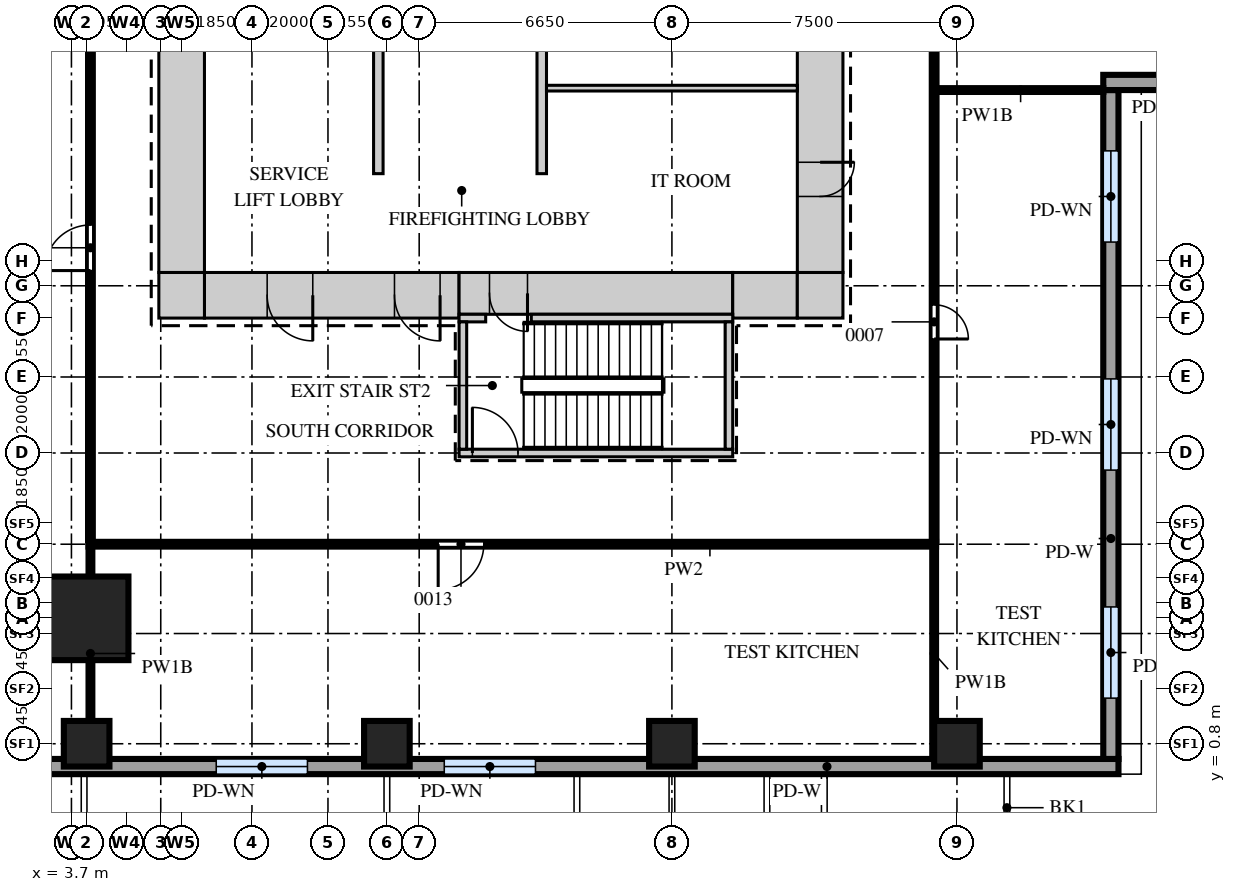
"""IFC4 building model, lengths in metres.
Left out: names, types, materials, properties, quantities, classifications, styles, units other than length and angle.
Written with IfcOpenShell. Run it as: python <this file> out.ifc"""

import sys

from ifc_helpers import new_model, si_unit, direction, frame, frame_2d, origin, origin_2d, place, context, subcontext, project, spatial, rectangle, extrude, source, transform, mapped, element, fill, save


model = new_model("IFC4")
c1 = context("Model", 3, precision=1e-05, world=origin(), true_north=direction((0.0, 1.0)))
c2 = subcontext(c1, "Body", "Model", "MODEL_VIEW")
j1 = project(units=[si_unit("LENGTHUNIT", "METRE"), si_unit("PLANEANGLEUNIT", "RADIAN")], contexts=[c1])
p1 = place(None, origin())
s1 = spatial("IfcSite", under=j1, at=p1, CompositionType="ELEMENT")
p2 = place(p1, origin())
s2 = spatial("IfcBuilding", under=s1, at=p2, CompositionType="ELEMENT")
p3 = place(p2, frame((0.0, 0.0, 23.5)))
s3 = spatial("IfcBuildingStorey", under=s2, at=p3, CompositionType="ELEMENT", Elevation=23.5)
m1 = source(origin(), c2, "Body", "SweptSolid", [
    extrude(rectangle(XDim=6.7, YDim=1.2, at=frame_2d((3.35, 0.0))), origin(), (0.0, 0.0, 1.0), 4.7),
])
p4 = place(p3, frame((7.2, 12.6, 0.0), z_axis=(0.0, 0.0, 1.0), x_axis=(1.0, 0.0, 0.0)))
e1 = element("IfcWall", 1, at=p4, inside=s3, PredefinedType="SHEAR", context=c2, shape_type="MappedRepresentation", body=[
    mapped(m1, transform((0.0, 0.0, 0.0))),
])
m2 = source(origin(), c2, "Body", "SweptSolid", [
    extrude(rectangle(XDim=1.2, YDim=2.1, at=frame_2d((0.6, 1.05))), frame((0.0, 0.61, 0.0), z_axis=(0.0, -1.0, 0.0), x_axis=(1.0, 0.0, 0.0)), (0.0, 0.0, 1.0), 1.22),
])
p5 = place(p4, frame((5.0, 0.0, 0.0)))
e2 = element("IfcOpeningElement", 2, at=p5, cuts=e1, PredefinedType="OPENING", context=c2, shape_type="MappedRepresentation", body=[
    mapped(m2, transform((0.0, 0.0, 0.0))),
])
p6 = place(p4, frame((1.65, 0.0, 0.0)))
e3 = element("IfcOpeningElement", 3, at=p6, cuts=e1, PredefinedType="OPENING", context=c2, shape_type="MappedRepresentation", body=[
    mapped(m2, transform((0.0, 0.0, 0.0))),
])
m3 = source(origin(), c2, "Body", "SweptSolid", [
    extrude(rectangle(XDim=7.2, YDim=1.1, at=frame_2d((3.6, 0.0))), origin(), (0.0, 0.0, 1.0), 4.7),
])
p7 = place(p3, frame((13.9, 12.65, 0.0), z_axis=(0.0, 0.0, 1.0), x_axis=(1.0, 0.0, 0.0)))
e4 = element("IfcWall", 4, at=p7, inside=s3, PredefinedType="SHEAR", context=c2, shape_type="MappedRepresentation", body=[
    mapped(m3, transform((0.0, 0.0, 0.0))),
])
m4 = source(origin(), c2, "Body", "SweptSolid", [
    extrude(rectangle(XDim=1.0, YDim=2.1, at=frame_2d((0.5, 1.05))), frame((0.0, 0.56, 0.0), z_axis=(0.0, -1.0, 0.0), x_axis=(1.0, 0.0, 0.0)), (0.0, 0.0, 1.0), 1.12),
])
p8 = place(p7, frame((0.8, 0.0, 0.0)))
e5 = element("IfcOpeningElement", 5, at=p8, cuts=e4, PredefinedType="OPENING", context=c2, shape_type="MappedRepresentation", body=[
    mapped(m4, transform((0.0, 0.0, 0.0))),
])
m5 = source(origin(), c2, "Body", "SweptSolid", [
    extrude(rectangle(XDim=1.7, YDim=1.2, at=frame_2d((0.85, 0.0))), origin(), (0.0, 0.0, 1.0), 4.7),
])
p9 = place(p3, frame((21.1, 12.6, 0.0), z_axis=(0.0, 0.0, 1.0), x_axis=(1.0, 0.0, 0.0)))
e6 = element("IfcWall", 6, at=p9, inside=s3, PredefinedType="SHEAR", context=c2, shape_type="MappedRepresentation", body=[
    mapped(m5, transform((0.0, 0.0, 0.0))),
])
m6 = source(origin(), c2, "Body", "SweptSolid", [
    extrude(rectangle(XDim=1.2, YDim=1.2, at=frame_2d((0.6, 0.0))), origin(), (0.0, 0.0, 1.0), 4.7),
])
for number, where, z_axis, x_axis in (
    (7, (22.8, 12.6, 0.0), (0.0, 0.0, 1.0), (1.0, 0.0, 0.0)),
    (8, (6.0, 12.6, 0.0), (0.0, 0.0, 1.0), (1.0, 0.0, 0.0)),
):
    element("IfcWall", number, at=place(p3, frame(where, z_axis=z_axis, x_axis=x_axis)), inside=s3, PredefinedType="SHEAR", context=c2, shape_type="MappedRepresentation", body=[
        mapped(m6, transform((0.0, 0.0, 0.0))),
    ])
m7 = source(origin(), c2, "Body", "SweptSolid", [
    extrude(rectangle(XDim=27.6, YDim=1.2, at=frame_2d((13.8, 0.0))), origin(), (0.0, 0.0, 1.0), 4.7),
])
p10 = place(p3, frame((23.4, 13.2, 0.0), z_axis=(0.0, 0.0, 1.0), x_axis=(0.0, 1.0, 0.0)))
e9 = element("IfcWall", 9, at=p10, inside=s3, PredefinedType="SHEAR", context=c2, shape_type="MappedRepresentation", body=[
    mapped(m7, transform((0.0, 0.0, 0.0))),
])
m8 = source(origin(), c2, "Body", "SweptSolid", [
    extrude(rectangle(XDim=1.8, YDim=2.1, at=frame_2d((0.9, 1.05))), frame((0.0, 0.61, 0.0), z_axis=(0.0, -1.0, 0.0), x_axis=(1.0, 0.0, 0.0)), (0.0, 0.0, 1.0), 1.22),
])
p11 = place(p10, frame((22.4, 0.0, 0.0)))
e10 = element("IfcOpeningElement", 10, at=p11, cuts=e9, PredefinedType="OPENING", context=c2, shape_type="MappedRepresentation", body=[
    mapped(m8, transform((0.0, 0.0, 0.0))),
])
p12 = place(p10, frame((12.9, 0.0, 0.0)))
e11 = element("IfcOpeningElement", 11, at=p12, cuts=e9, PredefinedType="OPENING", context=c2, shape_type="MappedRepresentation", body=[
    mapped(m2, transform((0.0, 0.0, 0.0))),
])
m9 = source(origin(), c2, "Body", "SweptSolid", [
    extrude(rectangle(XDim=0.9, YDim=2.1, at=frame_2d((0.45, 1.05))), frame((0.0, 0.61, 0.0), z_axis=(0.0, -1.0, 0.0), x_axis=(1.0, 0.0, 0.0)), (0.0, 0.0, 1.0), 1.22),
])
p13 = place(p10, frame((2.0, 0.0, 0.0)))
e12 = element("IfcOpeningElement", 12, at=p13, cuts=e9, PredefinedType="OPENING", context=c2, shape_type="MappedRepresentation", body=[
    mapped(m9, transform((0.0, 0.0, 0.0))),
])
p14 = place(p10, frame((6.85, 0.0, 0.0)))
e13 = element("IfcOpeningElement", 13, at=p14, cuts=e9, PredefinedType="OPENING", context=c2, shape_type="MappedRepresentation", body=[
    mapped(m9, transform((0.0, 0.0, 0.0))),
])
p15 = place(p3, frame((6.6, 13.2, 0.0), z_axis=(0.0, 0.0, 1.0), x_axis=(0.0, 1.0, 0.0)))
e14 = element("IfcWall", 14, at=p15, inside=s3, PredefinedType="SHEAR", context=c2, shape_type="MappedRepresentation", body=[
    mapped(m7, transform((0.0, 0.0, 0.0))),
])
m10 = source(origin(), c2, "Body", "SweptSolid", [
    extrude(rectangle(XDim=0.7, YDim=0.2, at=frame_2d((0.35, 0.0))), origin(), (0.0, 0.0, 1.0), 4.7),
])
p16 = place(p3, frame((13.9, 12.0, 0.0), z_axis=(0.0, 0.0, 1.0), x_axis=(1.0, 0.0, 0.0)))
e15 = element("IfcWall", 15, at=p16, inside=s3, PredefinedType="SHEAR", context=c2, shape_type="MappedRepresentation", body=[
    mapped(m10, transform((0.0, 0.0, 0.0))),
])
m11 = source(origin(), c2, "Body", "SweptSolid", [
    extrude(rectangle(XDim=5.3, YDim=0.2, at=frame_2d((2.65, 0.0))), origin(), (0.0, 0.0, 1.0), 4.7),
])
p17 = place(p3, frame((15.8, 12.0, 0.0), z_axis=(0.0, 0.0, 1.0), x_axis=(1.0, 0.0, 0.0)))
e16 = element("IfcWall", 16, at=p17, inside=s3, PredefinedType="SHEAR", context=c2, shape_type="MappedRepresentation", body=[
    mapped(m11, transform((0.0, 0.0, 0.0))),
])
m12 = source(origin(), c2, "Body", "SweptSolid", [
    extrude(rectangle(XDim=7.2, YDim=0.2, at=frame_2d((3.6, 0.0))), origin(), (0.0, 0.0, 1.0), 4.7),
])
p18 = place(p3, frame((13.9, 8.45, 0.0), z_axis=(0.0, 0.0, 1.0), x_axis=(1.0, 0.0, 0.0)))
e17 = element("IfcWall", 17, at=p18, inside=s3, PredefinedType="SHEAR", context=c2, shape_type="MappedRepresentation", body=[
    mapped(m12, transform((0.0, 0.0, 0.0))),
])
m13 = source(origin(), c2, "Body", "SweptSolid", [
    extrude(rectangle(XDim=1.2, YDim=2.1, at=frame_2d((0.6, 1.05))), frame((0.0, 0.11, 0.0), z_axis=(0.0, -1.0, 0.0), x_axis=(1.0, 0.0, 0.0)), (0.0, 0.0, 1.0), 0.22),
])
p19 = place(p18, frame((0.35, 0.0, 0.0)))
e18 = element("IfcOpeningElement", 18, at=p19, cuts=e17, PredefinedType="OPENING", context=c2, shape_type="MappedRepresentation", body=[
    mapped(m13, transform((0.0, 0.0, 0.0))),
])
m14 = source(origin(), c2, "Body", "SweptSolid", [
    extrude(rectangle(XDim=3.35, YDim=0.2, at=frame_2d((1.675, 0.0))), origin(), (0.0, 0.0, 1.0), 4.7),
])
for number, where, z_axis, x_axis in (
    (19, (21.0, 8.55, 0.0), (0.0, 0.0, 1.0), (0.0, 1.0, 0.0)),
    (20, (14.0, 8.55, 0.0), (0.0, 0.0, 1.0), (0.0, 1.0, 0.0)),
):
    element("IfcWall", number, at=place(p3, frame(where, z_axis=z_axis, x_axis=x_axis)), inside=s3, PredefinedType="SHEAR", context=c2, shape_type="MappedRepresentation", body=[
        mapped(m14, transform((0.0, 0.0, 0.0))),
    ])
m15 = source(origin(), c2, "Body", "SweptSolid", [
    extrude(rectangle(XDim=3.4, YDim=0.25, at=frame_2d((1.7, 0.0))), origin(), (0.0, 0.0, 1.0), 4.7),
])
for number, where, z_axis, x_axis in (
    (21, (16.075, 15.8, 0.0), (0.0, 0.0, 1.0), (0.0, 1.0, 0.0)),
    (22, (11.775, 15.8, 0.0), (0.0, 0.0, 1.0), (0.0, 1.0, 0.0)),
):
    element("IfcWall", number, at=place(p3, frame(where, z_axis=z_axis, x_axis=x_axis)), inside=s3, PredefinedType="STANDARD", context=c2, shape_type="MappedRepresentation", body=[
        mapped(m15, transform((0.0, 0.0, 0.0))),
    ])
m16 = source(origin(), c2, "Body", "SweptSolid", [
    extrude(rectangle(XDim=2.2, YDim=2.2, at=origin_2d()), origin(), (0.0, 0.0, 1.0), 4.7),
])
p20 = place(p3, frame((4.1, 4.1, 0.0), z_axis=(0.0, 0.0, 1.0), x_axis=(1.0, 0.0, 0.0)))
e23 = element("IfcColumn", 23, at=p20, inside=s3, PredefinedType="COLUMN", context=c2, shape_type="MappedRepresentation", body=[
    mapped(m16, transform((0.0, 0.0, 0.0))),
])
m17 = source(origin(), c2, "Body", "SweptSolid", [
    extrude(rectangle(XDim=1.2, YDim=1.2, at=origin_2d()), origin(), (0.0, 0.0, 1.0), 4.7),
])
for number, where, z_axis, x_axis in (
    (24, (4.1, 0.8, 0.0), (0.0, 0.0, 1.0), (1.0, 0.0, 0.0)),
    (25, (12.0, 0.8, 0.0), (0.0, 0.0, 1.0), (1.0, 0.0, 0.0)),
    (26, (19.5, 0.8, 0.0), (0.0, 0.0, 1.0), (1.0, 0.0, 0.0)),
    (27, (27.0, 0.8, 0.0), (0.0, 0.0, 1.0), (1.0, 0.0, 0.0)),
):
    element("IfcColumn", number, at=place(p3, frame(where, z_axis=z_axis, x_axis=x_axis)), inside=s3, PredefinedType="COLUMN", context=c2, shape_type="MappedRepresentation", body=[
        mapped(m17, transform((0.0, 0.0, 0.0))),
    ])
m18 = source(origin(), c2, "Body", "SweptSolid", [
    extrude(rectangle(XDim=33.04, YDim=0.4, at=frame_2d((16.52, 0.0))), origin(), (0.0, 0.0, 1.0), 4.7),
])
p21 = place(p3, frame((-1.79, 0.2, 0.0), z_axis=(0.0, 0.0, 1.0), x_axis=(1.0, 0.0, 0.0)))
e28 = element("IfcWall", 28, at=p21, inside=s3, PredefinedType="SOLIDWALL", context=c2, shape_type="MappedRepresentation", body=[
    mapped(m18, transform((0.0, 0.0, 0.0))),
])
m19 = source(origin(), c2, "Body", "SweptSolid", [
    extrude(rectangle(XDim=2.4, YDim=2.4, at=frame_2d((1.2, 1.2))), frame((0.0, 0.21, 0.0), z_axis=(0.0, -1.0, 0.0), x_axis=(1.0, 0.0, 0.0)), (0.0, 0.0, 1.0), 0.42),
])
p22 = place(p21, frame((9.3, 0.0, 1.0)))
e29 = element("IfcOpeningElement", 29, at=p22, cuts=e28, PredefinedType="OPENING", context=c2, shape_type="MappedRepresentation", body=[
    mapped(m19, transform((0.0, 0.0, 0.0))),
])
p23 = place(p21, frame((15.3, 0.0, 1.0)))
e30 = element("IfcOpeningElement", 30, at=p23, cuts=e28, PredefinedType="OPENING", context=c2, shape_type="MappedRepresentation", body=[
    mapped(m19, transform((0.0, 0.0, 0.0))),
])
m20 = source(origin(), c2, "Body", "SweptSolid", [
    extrude(rectangle(XDim=17.6, YDim=0.4, at=frame_2d((8.8, 0.0))), origin(), (0.0, 0.0, 1.0), 4.7),
])
p24 = place(p3, frame((31.05, 0.4, 0.0), z_axis=(0.0, 0.0, 1.0), x_axis=(0.0, 1.0, 0.0)))
e31 = element("IfcWall", 31, at=p24, inside=s3, PredefinedType="SOLIDWALL", context=c2, shape_type="MappedRepresentation", body=[
    mapped(m20, transform((0.0, 0.0, 0.0))),
])
p25 = place(p24, frame((1.6, 0.0, 1.0)))
e32 = element("IfcOpeningElement", 32, at=p25, cuts=e31, PredefinedType="OPENING", context=c2, shape_type="MappedRepresentation", body=[
    mapped(m19, transform((0.0, 0.0, 0.0))),
])
p26 = place(p24, frame((7.6, 0.0, 1.0)))
e33 = element("IfcOpeningElement", 33, at=p26, cuts=e31, PredefinedType="OPENING", context=c2, shape_type="MappedRepresentation", body=[
    mapped(m19, transform((0.0, 0.0, 0.0))),
])
p27 = place(p24, frame((13.6, 0.0, 1.0)))
e34 = element("IfcOpeningElement", 34, at=p27, cuts=e31, PredefinedType="OPENING", context=c2, shape_type="MappedRepresentation", body=[
    mapped(m19, transform((0.0, 0.0, 0.0))),
])
m21 = source(origin(), c2, "Body", "SweptSolid", [
    extrude(rectangle(XDim=9.9, YDim=0.4, at=frame_2d((4.95, 0.0))), origin(), (0.0, 0.0, 1.0), 4.7),
])
p28 = place(p3, frame((30.85, 18.2, 0.0), z_axis=(0.0, 0.0, 1.0), x_axis=(1.0, 0.0, 0.0)))
e35 = element("IfcWall", 35, at=p28, inside=s3, PredefinedType="SOLIDWALL", context=c2, shape_type="MappedRepresentation", body=[
    mapped(m21, transform((0.0, 0.0, 0.0))),
])
p29 = place(p28, frame((3.75, 0.0, 1.0)))
e36 = element("IfcOpeningElement", 36, at=p29, cuts=e35, PredefinedType="OPENING", context=c2, shape_type="MappedRepresentation", body=[
    mapped(m19, transform((0.0, 0.0, 0.0))),
])
m22 = source(origin(), c2, "Body", "SweptSolid", [
    extrude(rectangle(XDim=5.55, YDim=0.1, at=frame_2d((2.775, 0.0))), origin(), (0.0, 0.0, 1.0), 4.7),
])
for number, where, z_axis, x_axis in (
    (37, (4.2, 0.4, 0.0), (0.0, 0.0, 1.0), (0.0, 1.0, 0.0)),
    (38, (26.4, 0.4, 0.0), (0.0, 0.0, 1.0), (0.0, 1.0, 0.0)),
):
    element("IfcWall", number, at=place(p3, frame(where, z_axis=z_axis, x_axis=x_axis)), inside=s3, PredefinedType="PARTITIONING", context=c2, shape_type="MappedRepresentation", body=[
        mapped(m22, transform((0.0, 0.0, 0.0))),
    ])
m23 = source(origin(), c2, "Body", "SweptSolid", [
    extrude(rectangle(XDim=22.3, YDim=0.125, at=frame_2d((11.15, 0.0))), origin(), (0.0, 0.0, 1.0), 4.7),
])
p30 = place(p3, frame((4.15, 6.05, 0.0), z_axis=(0.0, 0.0, 1.0), x_axis=(1.0, 0.0, 0.0)))
e39 = element("IfcWall", 39, at=p30, inside=s3, PredefinedType="PARTITIONING", context=c2, shape_type="MappedRepresentation", body=[
    mapped(m23, transform((0.0, 0.0, 0.0))),
])
m24 = source(origin(), c2, "Body", "SweptSolid", [
    extrude(rectangle(XDim=1.2, YDim=2.1, at=frame_2d((0.6, 1.05))), frame((0.0, 0.073, 0.0), z_axis=(0.0, -1.0, 0.0), x_axis=(1.0, 0.0, 0.0)), (0.0, 0.0, 1.0), 0.145),
])
p31 = place(p30, frame((9.2, 0.0, 0.0)))
e40 = element("IfcOpeningElement", 40, at=p31, cuts=e39, PredefinedType="OPENING", context=c2, shape_type="MappedRepresentation", body=[
    mapped(m24, transform((0.0, 0.0, 0.0))),
])
m25 = source(origin(), c2, "Body", "SweptSolid", [
    extrude(rectangle(XDim=41.8, YDim=0.125, at=frame_2d((20.9, 0.0))), origin(), (0.0, 0.0, 1.0), 4.7),
])
p32 = place(p3, frame((4.2, 6.15, 0.0), z_axis=(0.0, 0.0, 1.0), x_axis=(0.0, 1.0, 0.0)))
e41 = element("IfcWall", 41, at=p32, inside=s3, PredefinedType="PARTITIONING", context=c2, shape_type="MappedRepresentation", body=[
    mapped(m25, transform((0.0, 0.0, 0.0))),
])
p33 = place(p32, frame((7.1, 0.0, 0.0)))
e42 = element("IfcOpeningElement", 42, at=p33, cuts=e41, PredefinedType="OPENING", context=c2, shape_type="MappedRepresentation", body=[
    mapped(m24, transform((0.0, 0.0, 0.0))),
])
p34 = place(p32, frame((25.85, 0.0, 0.0)))
e43 = element("IfcOpeningElement", 43, at=p34, cuts=e41, PredefinedType="OPENING", context=c2, shape_type="MappedRepresentation", body=[
    mapped(m24, transform((0.0, 0.0, 0.0))),
])
m26 = source(origin(), c2, "Body", "SweptSolid", [
    extrude(rectangle(XDim=27.15, YDim=0.125, at=frame_2d((13.575, 0.0))), origin(), (0.0, 0.0, 1.0), 4.7),
])
p35 = place(p3, frame((26.4, 6.15, 0.0), z_axis=(0.0, 0.0, 1.0), x_axis=(0.0, 1.0, 0.0)))
e44 = element("IfcWall", 44, at=p35, inside=s3, PredefinedType="PARTITIONING", context=c2, shape_type="MappedRepresentation", body=[
    mapped(m26, transform((0.0, 0.0, 0.0))),
])
m27 = source(origin(), c2, "Body", "SweptSolid", [
    extrude(rectangle(XDim=0.9, YDim=2.1, at=frame_2d((0.45, 1.05))), frame((0.0, 0.073, 0.0), z_axis=(0.0, -1.0, 0.0), x_axis=(1.0, 0.0, 0.0)), (0.0, 0.0, 1.0), 0.145),
])
p36 = place(p35, frame((5.3, 0.0, 0.0)))
e45 = element("IfcOpeningElement", 45, at=p36, cuts=e44, PredefinedType="OPENING", context=c2, shape_type="MappedRepresentation", body=[
    mapped(m27, transform((0.0, 0.0, 0.0))),
])
m28 = source(origin(), c2, "Body", "SweptSolid", [
    extrude(rectangle(XDim=4.35, YDim=0.1, at=frame_2d((2.175, 0.0))), origin(), (0.0, 0.0, 1.0), 4.7),
])
p37 = place(p3, frame((26.5, 18.0, 0.0), z_axis=(0.0, 0.0, 1.0), x_axis=(1.0, 0.0, 0.0)))
e46 = element("IfcWall", 46, at=p37, inside=s3, PredefinedType="PARTITIONING", context=c2, shape_type="MappedRepresentation", body=[
    mapped(m28, transform((0.0, 0.0, 0.0))),
])
m29 = source(origin(), c2, "Body", "SweptSolid", [
    extrude(rectangle(XDim=6.6, YDim=0.15, at=frame_2d((3.3, 0.0))), origin(), (0.0, 0.0, 1.0), 4.7),
])
p38 = place(p3, frame((16.2, 18.05, 0.0), z_axis=(0.0, 0.0, 1.0), x_axis=(1.0, 0.0, 0.0)))
e47 = element("IfcWall", 47, at=p38, inside=s3, PredefinedType="PARTITIONING", context=c2, shape_type="MappedRepresentation", body=[
    mapped(m29, transform((0.0, 0.0, 0.0))),
])
m30 = source(origin(), c2, "Body", "SweptSolid", [
    extrude(rectangle(XDim=2.4, YDim=2.4, at=frame_2d((1.2, 1.2))), frame((0.0, 0.03, 0.0), z_axis=(0.0, -1.0, 0.0), x_axis=(1.0, 0.0, 0.0)), (0.0, 0.0, 1.0), 0.06),
])
p39 = place(p22, origin())
e48 = element("IfcWindow", 48, at=p39, inside=s3, PartitioningType="SINGLE_PANEL", PredefinedType="WINDOW", context=c2, shape_type="MappedRepresentation", body=[
    mapped(m30, transform((0.0, 0.0, 0.0))),
])
fill(e29, e48)
p40 = place(p23, origin())
e49 = element("IfcWindow", 49, at=p40, inside=s3, PartitioningType="SINGLE_PANEL", PredefinedType="WINDOW", context=c2, shape_type="MappedRepresentation", body=[
    mapped(m30, transform((0.0, 0.0, 0.0))),
])
fill(e30, e49)
p41 = place(p25, origin())
e50 = element("IfcWindow", 50, at=p41, inside=s3, PartitioningType="SINGLE_PANEL", PredefinedType="WINDOW", context=c2, shape_type="MappedRepresentation", body=[
    mapped(m30, transform((0.0, 0.0, 0.0))),
])
fill(e32, e50)
p42 = place(p26, origin())
e51 = element("IfcWindow", 51, at=p42, inside=s3, PartitioningType="SINGLE_PANEL", PredefinedType="WINDOW", context=c2, shape_type="MappedRepresentation", body=[
    mapped(m30, transform((0.0, 0.0, 0.0))),
])
fill(e33, e51)
p43 = place(p27, origin())
e52 = element("IfcWindow", 52, at=p43, inside=s3, PartitioningType="SINGLE_PANEL", PredefinedType="WINDOW", context=c2, shape_type="MappedRepresentation", body=[
    mapped(m30, transform((0.0, 0.0, 0.0))),
])
fill(e34, e52)
m31 = source(origin(), c2, "Body", "SweptSolid", [
    extrude(rectangle(XDim=0.9, YDim=2.1, at=frame_2d((0.45, 1.05))), frame((0.0, 0.55, 0.0), z_axis=(0.0, -1.0, 0.0), x_axis=(1.0, 0.0, 0.0)), (0.0, 0.0, 1.0), 1.1),
])
p44 = place(p13, origin())
e53 = element("IfcDoor", 53, at=p44, inside=s3, OperationType="SINGLE_SWING_RIGHT", PredefinedType="DOOR", context=c2, shape_type="MappedRepresentation", body=[
    mapped(m31, transform((0.0, 0.0, 0.0))),
])
fill(e12, e53)
m32 = source(origin(), c2, "Body", "SweptSolid", [
    extrude(rectangle(XDim=1.2, YDim=2.1, at=frame_2d((0.6, 1.05))), frame((0.0, 0.55, 0.0), z_axis=(0.0, -1.0, 0.0), x_axis=(1.0, 0.0, 0.0)), (0.0, 0.0, 1.0), 1.1),
])
p45 = place(p5, origin())
e54 = element("IfcDoor", 54, at=p45, inside=s3, OperationType="SINGLE_SWING_RIGHT", PredefinedType="DOOR", context=c2, shape_type="MappedRepresentation", body=[
    mapped(m32, transform((0.0, 0.0, 0.0))),
])
fill(e2, e54)
p46 = place(p6, origin())
e55 = element("IfcDoor", 55, at=p46, inside=s3, OperationType="SINGLE_SWING_RIGHT", PredefinedType="DOOR", context=c2, shape_type="MappedRepresentation", body=[
    mapped(m32, transform((0.0, 0.0, 0.0))),
])
fill(e3, e55)
m33 = source(origin(), c2, "Body", "SweptSolid", [
    extrude(rectangle(XDim=1.0, YDim=2.1, at=frame_2d((0.5, 1.05))), frame((0.0, 0.5, 0.0), z_axis=(0.0, -1.0, 0.0), x_axis=(1.0, 0.0, 0.0)), (0.0, 0.0, 1.0), 1.0),
])
p47 = place(p8, origin())
e56 = element("IfcDoor", 56, at=p47, inside=s3, OperationType="SINGLE_SWING_RIGHT", PredefinedType="DOOR", context=c2, shape_type="MappedRepresentation", body=[
    mapped(m33, transform((0.0, 0.0, 0.0))),
])
fill(e5, e56)
m34 = source(origin(), c2, "Body", "SweptSolid", [
    extrude(rectangle(XDim=0.9, YDim=2.1, at=frame_2d((0.45, 1.05))), frame((0.0, 0.025, 0.0), z_axis=(0.0, -1.0, 0.0), x_axis=(1.0, 0.0, 0.0)), (0.0, 0.0, 1.0), 0.05),
])
p48 = place(p36, origin())
e57 = element("IfcDoor", 57, at=p48, inside=s3, OperationType="SINGLE_SWING_LEFT", PredefinedType="DOOR", context=c2, shape_type="MappedRepresentation", body=[
    mapped(m34, transform((0.0, 0.0, 0.0))),
])
fill(e45, e57)
m35 = source(origin(), c2, "Body", "SweptSolid", [
    extrude(rectangle(XDim=1.2, YDim=2.1, at=frame_2d((0.6, 1.05))), frame((0.0, 0.025, 0.0), z_axis=(0.0, -1.0, 0.0), x_axis=(1.0, 0.0, 0.0)), (0.0, 0.0, 1.0), 0.05),
])
p49 = place(p31, origin())
e58 = element("IfcDoor", 58, at=p49, inside=s3, OperationType="SINGLE_SWING_LEFT", PredefinedType="DOOR", context=c2, shape_type="MappedRepresentation", body=[
    mapped(m35, transform((0.0, 0.0, 0.0))),
])
fill(e40, e58)
p50 = place(p33, origin())
e59 = element("IfcDoor", 59, at=p50, inside=s3, OperationType="SINGLE_SWING_RIGHT", PredefinedType="DOOR", context=c2, shape_type="MappedRepresentation", body=[
    mapped(m35, transform((0.0, 0.0, 0.0))),
])
fill(e42, e59)
p51 = place(p19, origin())
e60 = element("IfcDoor", 60, at=p51, inside=s3, OperationType="SINGLE_SWING_RIGHT", PredefinedType="DOOR", context=c2, shape_type="MappedRepresentation", body=[
    mapped(m35, transform((0.0, 0.0, 0.0))),
])
fill(e18, e60)
save(model, sys.argv[1])
